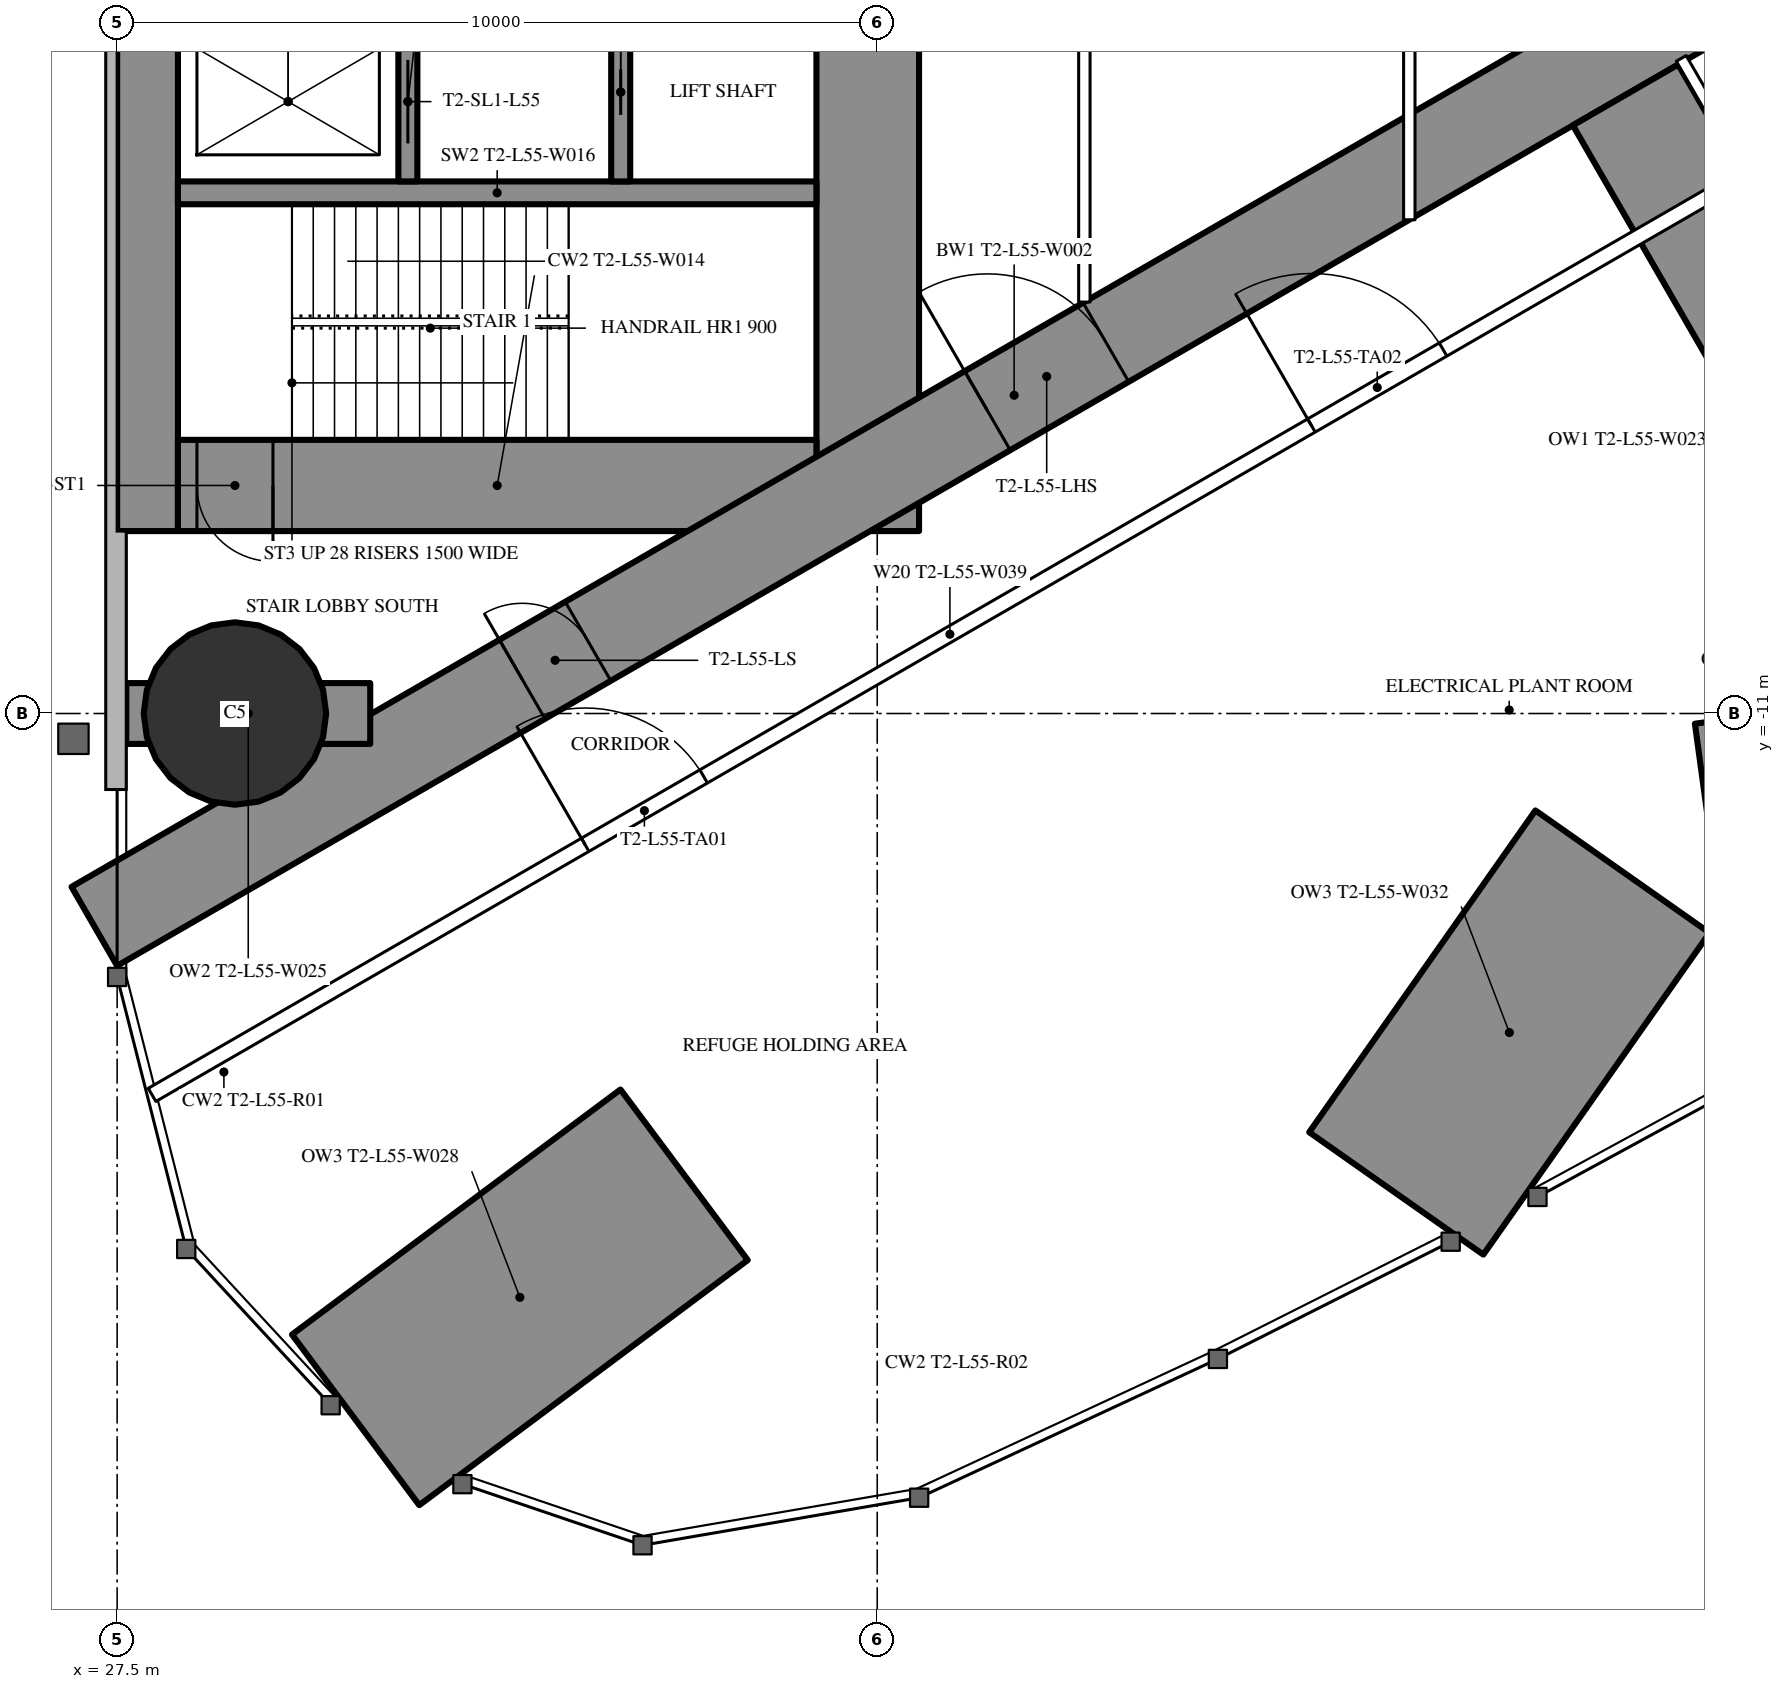
"""IFC4 building model, lengths in metres.
Left out: names, types, materials, properties, quantities, classifications, styles, units other than length and angle.
Written with IfcOpenShell. Run it as: python <this file> out.ifc"""

import sys

from ifc_helpers import new_model, si_unit, direction, frame, frame_2d, origin, origin_2d, place, context, subcontext, project, spatial, rectangle, hollow_circle, extrude, element, fill, save


model = new_model("IFC4")
c1 = context("Model", 3, precision=1e-05, world=origin(), true_north=direction((0.0, 1.0)))
c2 = subcontext(c1, "Body", "Model", "MODEL_VIEW")
j1 = project(units=[si_unit("LENGTHUNIT", "METRE"), si_unit("PLANEANGLEUNIT", "RADIAN")], contexts=[c1])
p1 = place(None, origin())
s1 = spatial("IfcSite", under=j1, at=p1, CompositionType="ELEMENT")
p2 = place(p1, origin())
s2 = spatial("IfcBuilding", under=s1, at=p2, CompositionType="ELEMENT")
p3 = place(p2, frame((0.0, 0.0, 205.3)))
s3 = spatial("IfcBuildingStorey", under=s2, at=p3, CompositionType="ELEMENT", Elevation=205.3)
p4 = place(p3, frame((30.637, -20.293, 0.0), z_axis=(0.0, 0.0, 1.0), x_axis=(0.80154582286, 0.597933352352, 0.0)))
e1 = element("IfcWall", 1, at=p4, inside=s3, PredefinedType="SHEAR", context=c2, shape_type="SweptSolid", body=[
    extrude(rectangle(XDim=5.392, YDim=2.8, at=frame_2d((2.696, 0.0))), origin(), (0.0, 0.0, 1.0), 5.0),
])
p5 = place(p3, frame((29.05, -11.0, 0.0), z_axis=(0.0, 0.0, 1.0), x_axis=(1.0, 0.0, 0.0)))
e2 = element("IfcColumn", 2, at=p5, inside=s3, PredefinedType="COLUMN", context=c2, shape_type="SweptSolid", body=[
    extrude(hollow_circle(Radius=1.2, WallThickness=0.09, at=origin_2d()), origin(), (0.0, 0.0, 1.0), 5.0),
])
p6 = place(p3, frame((44.328, -17.314, 0.0), z_axis=(0.0, 0.0, 1.0), x_axis=(0.575107689221, 0.818077713789, 0.0)))
e3 = element("IfcWall", 3, at=p6, inside=s3, PredefinedType="SHEAR", context=c2, shape_type="SweptSolid", body=[
    extrude(rectangle(XDim=5.175, YDim=2.8, at=frame_2d((2.587, 0.0))), origin(), (0.0, 0.0, 1.0), 5.0),
])
p7 = place(p3, frame((53.981, -11.765, 0.0), z_axis=(0.0, 0.0, 1.0), x_axis=(-0.99079635938, -0.135360903657, 0.0)))
e4 = element("IfcWall", 4, at=p7, inside=s3, PredefinedType="SHEAR", context=c2, shape_type="SweptSolid", body=[
    extrude(rectangle(XDim=5.586, YDim=2.8, at=frame_2d((2.793, 0.0))), origin(), (0.0, 0.0, 1.0), 5.0),
])
p8 = place(p3, frame((27.9, -8.6, 0.0), z_axis=(0.0, 0.0, 1.0), x_axis=(0.0, 1.0, 0.0)))
e5 = element("IfcWall", 5, at=p8, inside=s3, PredefinedType="SHEAR", context=c2, shape_type="SweptSolid", body=[
    extrude(rectangle(XDim=17.2, YDim=0.8, at=frame_2d((8.6, 0.0))), origin(), (0.0, 0.0, 1.0), 5.0),
])
p9 = place(p8, frame((9.35, 0.0, 0.0)))
e6 = element("IfcOpeningElement", 6, at=p9, cuts=e5, PredefinedType="OPENING", context=c2, shape_type="SweptSolid", body=[
    extrude(rectangle(XDim=0.9, YDim=2.2, at=frame_2d((0.45, 1.1))), frame((0.0, 0.41, 0.0), z_axis=(0.0, -1.0, 0.0), x_axis=(1.0, 0.0, 0.0)), (0.0, 0.0, 1.0), 0.82),
])
p10 = place(p3, frame((37.375, -8.6, 0.0), z_axis=(0.0, 0.0, 1.0), x_axis=(0.0, 1.0, 0.0)))
e7 = element("IfcWall", 7, at=p10, inside=s3, PredefinedType="SHEAR", context=c2, shape_type="SweptSolid", body=[
    extrude(rectangle(XDim=17.2, YDim=1.35, at=frame_2d((8.6, 0.0))), origin(), (0.0, 0.0, 1.0), 5.0),
])
p11 = place(p10, frame((7.7, 0.0, 0.0)))
e8 = element("IfcOpeningElement", 8, at=p11, cuts=e7, PredefinedType="OPENING", context=c2, shape_type="SweptSolid", body=[
    extrude(rectangle(XDim=1.8, YDim=2.2, at=frame_2d((0.9, 1.1))), frame((0.0, 0.685, 0.0), z_axis=(0.0, -1.0, 0.0), x_axis=(1.0, 0.0, 0.0)), (0.0, 0.0, 1.0), 1.37),
])
p12 = place(p3, frame((28.3, -8.0, 0.0), z_axis=(0.0, 0.0, 1.0), x_axis=(1.0, 0.0, 0.0)))
e9 = element("IfcWall", 9, at=p12, inside=s3, PredefinedType="SHEAR", context=c2, shape_type="SweptSolid", body=[
    extrude(rectangle(XDim=8.4, YDim=1.2, at=frame_2d((4.2, 0.0))), origin(), (0.0, 0.0, 1.0), 5.0),
])
p13 = place(p12, frame((0.25, 0.0, 0.0)))
e10 = element("IfcOpeningElement", 10, at=p13, cuts=e9, PredefinedType="OPENING", context=c2, shape_type="SweptSolid", body=[
    extrude(rectangle(XDim=1.0, YDim=2.2, at=frame_2d((0.5, 1.1))), frame((0.0, 0.61, 0.0), z_axis=(0.0, -1.0, 0.0), x_axis=(1.0, 0.0, 0.0)), (0.0, 0.0, 1.0), 1.22),
])
p14 = place(p3, frame((28.3, -4.15, 0.0), z_axis=(0.0, 0.0, 1.0), x_axis=(1.0, 0.0, 0.0)))
e11 = element("IfcWall", 11, at=p14, inside=s3, PredefinedType="SHEAR", context=c2, shape_type="SweptSolid", body=[
    extrude(rectangle(XDim=8.4, YDim=0.3, at=frame_2d((4.2, 0.0))), origin(), (0.0, 0.0, 1.0), 5.0),
])
p15 = place(p3, frame((31.325, -4.0, 0.0), z_axis=(0.0, 0.0, 1.0), x_axis=(0.0, 1.0, 0.0)))
e12 = element("IfcWall", 12, at=p15, inside=s3, PredefinedType="SHEAR", context=c2, shape_type="SweptSolid", body=[
    extrude(rectangle(XDim=2.1, YDim=0.25, at=frame_2d((1.05, 0.0))), origin(), (0.0, 0.0, 1.0), 5.0),
])
p16 = place(p15, frame((0.5, 0.0, 0.0)))
e13 = element("IfcOpeningElement", 13, at=p16, cuts=e12, PredefinedType="OPENING", context=c2, shape_type="SweptSolid", body=[
    extrude(rectangle(XDim=1.1, YDim=2.2, at=frame_2d((0.55, 1.1))), frame((0.0, 0.135, 0.0), z_axis=(0.0, -1.0, 0.0), x_axis=(1.0, 0.0, 0.0)), (0.0, 0.0, 1.0), 0.27),
])
p17 = place(p3, frame((34.125, -4.0, 0.0), z_axis=(0.0, 0.0, 1.0), x_axis=(0.0, 1.0, 0.0)))
e14 = element("IfcWall", 14, at=p17, inside=s3, PredefinedType="SHEAR", context=c2, shape_type="SweptSolid", body=[
    extrude(rectangle(XDim=2.35, YDim=0.25, at=frame_2d((1.175, 0.0))), origin(), (0.0, 0.0, 1.0), 5.0),
])
p18 = place(p17, frame((0.875, 0.0, 0.0)))
e15 = element("IfcOpeningElement", 15, at=p18, cuts=e14, PredefinedType="OPENING", context=c2, shape_type="SweptSolid", body=[
    extrude(rectangle(XDim=0.6, YDim=2.0, at=frame_2d((0.3, 1.0))), frame((0.0, 0.135, 0.0), z_axis=(0.0, -1.0, 0.0), x_axis=(1.0, 0.0, 0.0)), (0.0, 0.0, 1.0), 0.27),
])
p19 = place(p3, frame((27.2, -13.8, 0.0), z_axis=(0.0, 0.0, 1.0), x_axis=(0.866027159892, 0.499996958321, 0.0)))
e16 = element("IfcWall", 16, at=p19, inside=s3, PredefinedType="SHEAR", context=c2, shape_type="SweptSolid", body=[
    extrude(rectangle(XDim=27.947, YDim=1.2, at=frame_2d((13.973, 0.0))), origin(), (0.0, 0.0, 1.0), 5.0),
])
p20 = place(p19, frame((6.5, 0.0, 0.0)))
e17 = element("IfcOpeningElement", 17, at=p20, cuts=e16, PredefinedType="OPENING", context=c2, shape_type="SweptSolid", body=[
    extrude(rectangle(XDim=1.0, YDim=2.2, at=frame_2d((0.5, 1.1))), frame((0.0, 0.61, 0.0), z_axis=(0.0, -1.0, 0.0), x_axis=(1.0, 0.0, 0.0)), (0.0, 0.0, 1.0), 1.22),
])
p21 = place(p19, frame((13.568, 0.0, 0.0)))
e18 = element("IfcOpeningElement", 18, at=p21, cuts=e16, PredefinedType="OPENING", context=c2, shape_type="SweptSolid", body=[
    extrude(rectangle(XDim=1.8, YDim=2.2, at=frame_2d((0.9, 1.1))), frame((0.0, 0.61, 0.0), z_axis=(0.0, -1.0, 0.0), x_axis=(1.0, 0.0, 0.0)), (0.0, 0.0, 1.0), 1.22),
])
p22 = place(p3, frame((27.62, -11.0, 0.0), z_axis=(0.0, 0.0, 1.0), x_axis=(1.0, 0.0, 0.0)))
e19 = element("IfcWall", 19, at=p22, inside=s3, PredefinedType="SHEAR", context=c2, shape_type="SweptSolid", body=[
    extrude(rectangle(XDim=3.209, YDim=0.8, at=frame_2d((1.605, 0.0))), origin(), (0.0, 0.0, 1.0), 5.0),
])
p23 = place(p3, frame((47.345, -2.862, 0.0), z_axis=(0.0, 0.0, 1.0), x_axis=(0.500012973899, -0.866017913171, 0.0)))
e20 = element("IfcWall", 20, at=p23, inside=s3, PredefinedType="SHEAR", context=c2, shape_type="SweptSolid", body=[
    extrude(rectangle(XDim=10.499, YDim=1.6, at=frame_2d((5.25, 0.0))), origin(), (0.0, 0.0, 1.0), 5.0),
])
p24 = place(p23, frame((5.087, 0.0, 0.0)))
e21 = element("IfcOpeningElement", 21, at=p24, cuts=e20, PredefinedType="OPENING", context=c2, shape_type="SweptSolid", body=[
    extrude(rectangle(XDim=1.0, YDim=2.2, at=frame_2d((0.5, 1.1))), frame((0.0, 0.81, 0.0), z_axis=(0.0, -1.0, 0.0), x_axis=(1.0, 0.0, 0.0)), (0.0, 0.0, 1.0), 1.62),
])
p25 = place(p3, frame((27.959, -16.017, 0.0), z_axis=(0.0, 0.0, 1.0), x_axis=(0.866026253963, 0.499998527445, 0.0)))
e22 = element("IfcWall", 22, at=p25, inside=s3, PredefinedType="PARTITIONING", context=c2, shape_type="SweptSolid", body=[
    extrude(rectangle(XDim=24.241, YDim=0.2, at=frame_2d((12.12, 0.0))), origin(), (0.0, 0.0, 1.0), 4.75),
])
p26 = place(p25, frame((6.579, 0.0, 0.0)))
e23 = element("IfcOpeningElement", 23, at=p26, cuts=e22, PredefinedType="OPENING", context=c2, shape_type="SweptSolid", body=[
    extrude(rectangle(XDim=1.8, YDim=2.2, at=frame_2d((0.9, 1.1))), frame((0.0, 0.11, 0.0), z_axis=(0.0, -1.0, 0.0), x_axis=(1.0, 0.0, 0.0)), (0.0, 0.0, 1.0), 0.22),
])
p27 = place(p25, frame((17.612, 0.0, 0.0)))
e24 = element("IfcOpeningElement", 24, at=p27, cuts=e22, PredefinedType="OPENING", context=c2, shape_type="SweptSolid", body=[
    extrude(rectangle(XDim=2.0, YDim=2.4, at=frame_2d((1.0, 1.2))), frame((0.0, 0.11, 0.0), z_axis=(0.0, -1.0, 0.0), x_axis=(1.0, 0.0, 0.0)), (0.0, 0.0, 1.0), 0.22),
])
p28 = place(p3, frame((48.953, -3.897, 0.0), z_axis=(0.0, 0.0, 1.0), x_axis=(-0.499980071345, 0.866036909293, 0.0)))
e25 = element("IfcWall", 25, at=p28, inside=s3, PredefinedType="PARTITIONING", context=c2, shape_type="SweptSolid", body=[
    extrude(rectangle(XDim=1.75, YDim=0.15, at=frame_2d((0.875, 0.0))), origin(), (0.0, 0.0, 1.0), 4.75),
])
p29 = place(p3, frame((40.225, -5.587, 0.0), z_axis=(0.0, 0.0, 1.0), x_axis=(0.0, 1.0, 0.0)))
e26 = element("IfcWall", 26, at=p29, inside=s3, PredefinedType="PARTITIONING", context=c2, shape_type="SweptSolid", body=[
    extrude(rectangle(XDim=11.174, YDim=0.15, at=frame_2d((5.587, 0.0))), origin(), (0.0, 0.0, 1.0), 4.75),
])
p30 = place(p29, frame((4.687, 0.0, 0.0)))
e27 = element("IfcOpeningElement", 27, at=p30, cuts=e26, PredefinedType="OPENING", context=c2, shape_type="SweptSolid", body=[
    extrude(rectangle(XDim=1.8, YDim=2.2, at=frame_2d((0.9, 1.1))), frame((0.0, 0.085, 0.0), z_axis=(0.0, -1.0, 0.0), x_axis=(1.0, 0.0, 0.0)), (0.0, 0.0, 1.0), 0.17),
])
p31 = place(p3, frame((44.5, -4.505, 0.0), z_axis=(0.0, 0.0, 1.0), x_axis=(0.0, 1.0, 0.0)))
e28 = element("IfcWall", 28, at=p31, inside=s3, PredefinedType="PARTITIONING", context=c2, shape_type="SweptSolid", body=[
    extrude(rectangle(XDim=9.009, YDim=0.15, at=frame_2d((4.505, 0.0))), origin(), (0.0, 0.0, 1.0), 4.75),
])
p32 = place(p31, frame((4.005, 0.0, 0.0)))
e29 = element("IfcOpeningElement", 29, at=p32, cuts=e28, PredefinedType="OPENING", context=c2, shape_type="SweptSolid", body=[
    extrude(rectangle(XDim=1.0, YDim=2.2, at=frame_2d((0.5, 1.1))), frame((0.0, 0.085, 0.0), z_axis=(0.0, -1.0, 0.0), x_axis=(1.0, 0.0, 0.0)), (0.0, 0.0, 1.0), 0.17),
])
p33 = place(p26, origin())
e30 = element("IfcDoor", 30, at=p33, inside=s3, OperationType="DOUBLE_DOOR_SINGLE_SWING", PredefinedType="DOOR", context=c2, shape_type="SweptSolid", body=[
    extrude(rectangle(XDim=1.8, YDim=2.2, at=frame_2d((0.9, 1.1))), frame((0.0, 0.025, 0.0), z_axis=(0.0, -1.0, 0.0), x_axis=(1.0, 0.0, 0.0)), (0.0, 0.0, 1.0), 0.05),
])
fill(e23, e30)
p34 = place(p27, origin())
e31 = element("IfcDoor", 31, at=p34, inside=s3, OperationType="DOUBLE_DOOR_SINGLE_SWING", PredefinedType="DOOR", context=c2, shape_type="SweptSolid", body=[
    extrude(rectangle(XDim=2.0, YDim=2.4, at=frame_2d((1.0, 1.2))), frame((0.0, 0.025, 0.0), z_axis=(0.0, -1.0, 0.0), x_axis=(1.0, 0.0, 0.0)), (0.0, 0.0, 1.0), 0.05),
])
fill(e24, e31)
p35 = place(p20, origin())
e32 = element("IfcDoor", 32, at=p35, inside=s3, OperationType="SINGLE_SWING_LEFT", PredefinedType="DOOR", context=c2, shape_type="SweptSolid", body=[
    extrude(rectangle(XDim=1.0, YDim=2.2, at=frame_2d((0.5, 1.1))), frame((0.0, 0.025, 0.0), z_axis=(0.0, -1.0, 0.0), x_axis=(1.0, 0.0, 0.0)), (0.0, 0.0, 1.0), 0.05),
])
fill(e17, e32)
p36 = place(p21, origin())
e33 = element("IfcDoor", 33, at=p36, inside=s3, OperationType="DOUBLE_DOOR_SINGLE_SWING", PredefinedType="DOOR", context=c2, shape_type="SweptSolid", body=[
    extrude(rectangle(XDim=1.8, YDim=2.2, at=frame_2d((0.9, 1.1))), frame((0.0, 0.025, 0.0), z_axis=(0.0, -1.0, 0.0), x_axis=(1.0, 0.0, 0.0)), (0.0, 0.0, 1.0), 0.05),
])
fill(e18, e33)
p37 = place(p13, origin())
e34 = element("IfcDoor", 34, at=p37, inside=s3, OperationType="SINGLE_SWING_RIGHT", PredefinedType="DOOR", context=c2, shape_type="SweptSolid", body=[
    extrude(rectangle(XDim=1.0, YDim=2.2, at=frame_2d((0.5, 1.1))), frame((0.0, 0.025, 0.0), z_axis=(0.0, -1.0, 0.0), x_axis=(1.0, 0.0, 0.0)), (0.0, 0.0, 1.0), 0.05),
])
fill(e10, e34)
p38 = place(p16, origin())
e35 = element("IfcDoor", 35, at=p38, inside=s3, OperationType="SLIDING_TO_LEFT", PredefinedType="USERDEFINED", context=c2, shape_type="SweptSolid", body=[
    extrude(rectangle(XDim=1.1, YDim=2.2, at=frame_2d((0.55, 1.1))), frame((0.0, 0.025, 0.0), z_axis=(0.0, -1.0, 0.0), x_axis=(1.0, 0.0, 0.0)), (0.0, 0.0, 1.0), 0.05),
])
fill(e13, e35)
p39 = place(p18, origin())
e36 = element("IfcDoor", 36, at=p39, inside=s3, OperationType="SLIDING_TO_LEFT", PredefinedType="DOOR", context=c2, shape_type="SweptSolid", body=[
    extrude(rectangle(XDim=0.6, YDim=2.0, at=frame_2d((0.3, 1.0))), frame((0.0, 0.025, 0.0), z_axis=(0.0, -1.0, 0.0), x_axis=(1.0, 0.0, 0.0)), (0.0, 0.0, 1.0), 0.05),
])
fill(e15, e36)
save(model, sys.argv[1])
